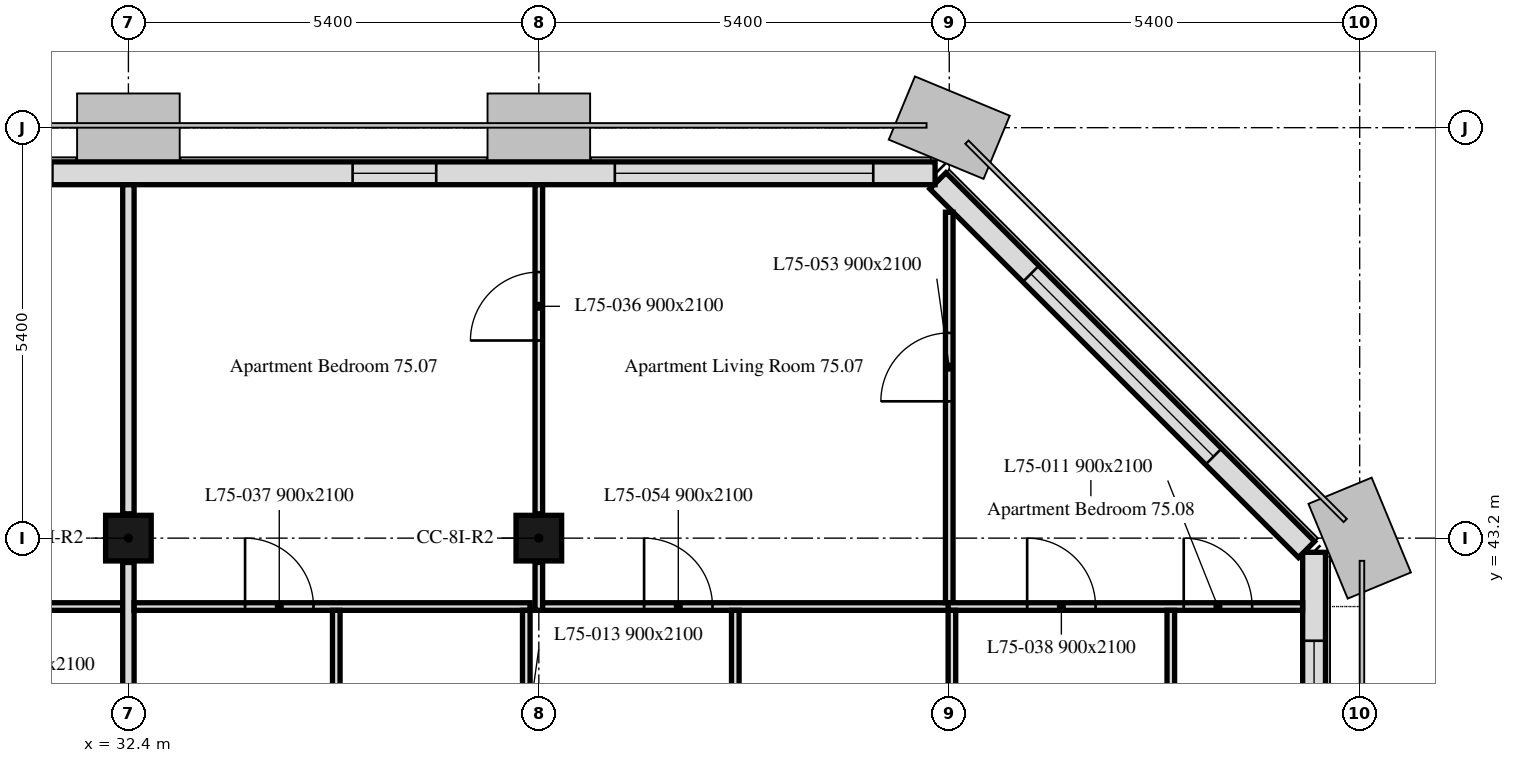
"""IFC4 building model, lengths in metres.
Left out: names, types, materials, properties, quantities, classifications, styles, units other than length and angle.
Written with IfcOpenShell. Run it as: python <this file> out.ifc"""

import sys

from ifc_helpers import new_model, si_unit, direction, frame, frame_2d, origin, origin_2d, place, context, subcontext, project, spatial, rectangle, extrude, element, fill, save


model = new_model("IFC4")
c1 = context("Model", 3, precision=1e-05, world=origin(), true_north=direction((0.0, 1.0)))
c2 = subcontext(c1, "Body", "Model", "MODEL_VIEW")
j1 = project(units=[si_unit("LENGTHUNIT", "METRE"), si_unit("PLANEANGLEUNIT", "RADIAN")], contexts=[c1])
p1 = place(None, origin())
s1 = spatial("IfcSite", under=j1, at=p1, CompositionType="ELEMENT")
p2 = place(p1, origin())
s2 = spatial("IfcBuilding", under=s1, at=p2, CompositionType="ELEMENT")
p3 = place(p2, frame((0.0, 0.0, 301.6)))
s3 = spatial("IfcBuildingStorey", under=s2, at=p3, CompositionType="ELEMENT", Elevation=301.6)
for number, where, z_axis, x_axis in (
    (1, (32.4, 43.2, 0.0), (0.0, 0.0, 1.0), (1.0, 0.0, 0.0)),
    (2, (37.8, 43.2, 0.0), (0.0, 0.0, 1.0), (1.0, 0.0, 0.0)),
):
    element("IfcColumn", number, at=place(p3, frame(where, z_axis=z_axis, x_axis=x_axis)), inside=s3, PredefinedType="COLUMN", context=c2, shape_type="SweptSolid", body=[
        extrude(rectangle(XDim=0.6, YDim=0.6, at=origin_2d()), origin(), (0.0, 0.0, 1.0), 3.0),
    ])
p4 = place(p3, frame((48.0, 10.986, 0.0), z_axis=(0.0, 0.0, 1.0), x_axis=(0.0, 1.0, 0.0)))
e3 = element("IfcWall", 3, at=p4, inside=s3, PredefinedType="SOLIDWALL", context=c2, shape_type="SweptSolid", body=[
    extrude(rectangle(XDim=32.027, YDim=0.3, at=frame_2d((16.014, 0.0))), origin(), (0.0, 0.0, 1.0), 3.0),
])
p5 = place(p4, frame((1.314, 0.0, 0.9)))
e4 = element("IfcOpeningElement", 4, at=p5, cuts=e3, PredefinedType="OPENING", context=c2, shape_type="SweptSolid", body=[
    extrude(rectangle(XDim=1.1, YDim=1.7, at=frame_2d((0.55, 0.85))), frame((0.0, 0.16, 0.0), z_axis=(0.0, -1.0, 0.0), x_axis=(1.0, 0.0, 0.0)), (0.0, 0.0, 1.0), 0.32),
])
p6 = place(p4, frame((2.589, 0.0, 0.9)))
e5 = element("IfcOpeningElement", 5, at=p6, cuts=e3, PredefinedType="OPENING", context=c2, shape_type="SweptSolid", body=[
    extrude(rectangle(XDim=0.65, YDim=1.7, at=frame_2d((0.325, 0.85))), frame((0.0, 0.16, 0.0), z_axis=(0.0, -1.0, 0.0), x_axis=(1.0, 0.0, 0.0)), (0.0, 0.0, 1.0), 0.32),
])
p7 = place(p4, frame((6.564, 0.0, 0.9)))
e6 = element("IfcOpeningElement", 6, at=p7, cuts=e3, PredefinedType="OPENING", context=c2, shape_type="SweptSolid", body=[
    extrude(rectangle(XDim=1.1, YDim=1.7, at=frame_2d((0.55, 0.85))), frame((0.0, 0.16, 0.0), z_axis=(0.0, -1.0, 0.0), x_axis=(1.0, 0.0, 0.0)), (0.0, 0.0, 1.0), 0.32),
])
p8 = place(p4, frame((8.164, 0.0, 0.9)))
e7 = element("IfcOpeningElement", 7, at=p8, cuts=e3, PredefinedType="OPENING", context=c2, shape_type="SweptSolid", body=[
    extrude(rectangle(XDim=1.1, YDim=1.7, at=frame_2d((0.55, 0.85))), frame((0.0, 0.16, 0.0), z_axis=(0.0, -1.0, 0.0), x_axis=(1.0, 0.0, 0.0)), (0.0, 0.0, 1.0), 0.32),
])
p9 = place(p4, frame((11.614, 0.0, 0.9)))
e8 = element("IfcOpeningElement", 8, at=p9, cuts=e3, PredefinedType="OPENING", context=c2, shape_type="SweptSolid", body=[
    extrude(rectangle(XDim=3.4, YDim=1.7, at=frame_2d((1.7, 0.85))), frame((0.0, 0.16, 0.0), z_axis=(0.0, -1.0, 0.0), x_axis=(1.0, 0.0, 0.0)), (0.0, 0.0, 1.0), 0.32),
])
p10 = place(p4, frame((17.364, 0.0, 0.9)))
e9 = element("IfcOpeningElement", 9, at=p10, cuts=e3, PredefinedType="OPENING", context=c2, shape_type="SweptSolid", body=[
    extrude(rectangle(XDim=1.1, YDim=1.7, at=frame_2d((0.55, 0.85))), frame((0.0, 0.16, 0.0), z_axis=(0.0, -1.0, 0.0), x_axis=(1.0, 0.0, 0.0)), (0.0, 0.0, 1.0), 0.32),
])
p11 = place(p4, frame((18.964, 0.0, 0.9)))
e10 = element("IfcOpeningElement", 10, at=p11, cuts=e3, PredefinedType="OPENING", context=c2, shape_type="SweptSolid", body=[
    extrude(rectangle(XDim=1.1, YDim=1.7, at=frame_2d((0.55, 0.85))), frame((0.0, 0.16, 0.0), z_axis=(0.0, -1.0, 0.0), x_axis=(1.0, 0.0, 0.0)), (0.0, 0.0, 1.0), 0.32),
])
p12 = place(p4, frame((23.389, 0.0, 0.9)))
e11 = element("IfcOpeningElement", 11, at=p12, cuts=e3, PredefinedType="OPENING", context=c2, shape_type="SweptSolid", body=[
    extrude(rectangle(XDim=0.65, YDim=1.7, at=frame_2d((0.325, 0.85))), frame((0.0, 0.16, 0.0), z_axis=(0.0, -1.0, 0.0), x_axis=(1.0, 0.0, 0.0)), (0.0, 0.0, 1.0), 0.32),
])
p13 = place(p4, frame((24.364, 0.0, 0.9)))
e12 = element("IfcOpeningElement", 12, at=p13, cuts=e3, PredefinedType="OPENING", context=c2, shape_type="SweptSolid", body=[
    extrude(rectangle(XDim=1.1, YDim=1.7, at=frame_2d((0.55, 0.85))), frame((0.0, 0.16, 0.0), z_axis=(0.0, -1.0, 0.0), x_axis=(1.0, 0.0, 0.0)), (0.0, 0.0, 1.0), 0.32),
])
p14 = place(p4, frame((28.164, 0.0, 0.9)))
e13 = element("IfcOpeningElement", 13, at=p14, cuts=e3, PredefinedType="OPENING", context=c2, shape_type="SweptSolid", body=[
    extrude(rectangle(XDim=1.1, YDim=1.7, at=frame_2d((0.55, 0.85))), frame((0.0, 0.16, 0.0), z_axis=(0.0, -1.0, 0.0), x_axis=(1.0, 0.0, 0.0)), (0.0, 0.0, 1.0), 0.32),
])
p15 = place(p4, frame((29.764, 0.0, 0.9)))
e14 = element("IfcOpeningElement", 14, at=p15, cuts=e3, PredefinedType="OPENING", context=c2, shape_type="SweptSolid", body=[
    extrude(rectangle(XDim=1.1, YDim=1.7, at=frame_2d((0.55, 0.85))), frame((0.0, 0.16, 0.0), z_axis=(0.0, -1.0, 0.0), x_axis=(1.0, 0.0, 0.0)), (0.0, 0.0, 1.0), 0.32),
])
p16 = place(p3, frame((47.901, 43.051, 0.0), z_axis=(0.0, 0.0, 1.0), x_axis=(-0.707106781187, 0.707106781187, 0.0)))
e15 = element("IfcWall", 15, at=p16, inside=s3, PredefinedType="SOLIDWALL", context=c2, shape_type="SweptSolid", body=[
    extrude(rectangle(XDim=6.86, YDim=0.3, at=frame_2d((3.43, 0.0))), origin(), (0.0, 0.0, 1.0), 3.0),
])
p17 = place(p16, frame((1.73, 0.0, 0.9)))
e16 = element("IfcOpeningElement", 16, at=p17, cuts=e15, PredefinedType="OPENING", context=c2, shape_type="SweptSolid", body=[
    extrude(rectangle(XDim=3.4, YDim=1.7, at=frame_2d((1.7, 0.85))), frame((0.0, 0.16, 0.0), z_axis=(0.0, -1.0, 0.0), x_axis=(1.0, 0.0, 0.0)), (0.0, 0.0, 1.0), 0.32),
])
p18 = place(p3, frame((43.014, 48.0, 0.0), z_axis=(0.0, 0.0, 1.0), x_axis=(-1.0, 0.0, 0.0)))
e17 = element("IfcWall", 17, at=p18, inside=s3, PredefinedType="SOLIDWALL", context=c2, shape_type="SweptSolid", body=[
    extrude(rectangle(XDim=32.027, YDim=0.3, at=frame_2d((16.014, 0.0))), origin(), (0.0, 0.0, 1.0), 3.0),
])
p19 = place(p18, frame((0.814, 0.0, 0.9)))
e18 = element("IfcOpeningElement", 18, at=p19, cuts=e17, PredefinedType="OPENING", context=c2, shape_type="SweptSolid", body=[
    extrude(rectangle(XDim=3.4, YDim=1.7, at=frame_2d((1.7, 0.85))), frame((0.0, 0.16, 0.0), z_axis=(0.0, -1.0, 0.0), x_axis=(1.0, 0.0, 0.0)), (0.0, 0.0, 1.0), 0.32),
])
p20 = place(p18, frame((6.564, 0.0, 0.9)))
e19 = element("IfcOpeningElement", 19, at=p20, cuts=e17, PredefinedType="OPENING", context=c2, shape_type="SweptSolid", body=[
    extrude(rectangle(XDim=1.1, YDim=1.7, at=frame_2d((0.55, 0.85))), frame((0.0, 0.16, 0.0), z_axis=(0.0, -1.0, 0.0), x_axis=(1.0, 0.0, 0.0)), (0.0, 0.0, 1.0), 0.32),
])
p21 = place(p18, frame((11.614, 0.0, 0.9)))
e20 = element("IfcOpeningElement", 20, at=p21, cuts=e17, PredefinedType="OPENING", context=c2, shape_type="SweptSolid", body=[
    extrude(rectangle(XDim=3.4, YDim=1.7, at=frame_2d((1.7, 0.85))), frame((0.0, 0.16, 0.0), z_axis=(0.0, -1.0, 0.0), x_axis=(1.0, 0.0, 0.0)), (0.0, 0.0, 1.0), 0.32),
])
p22 = place(p18, frame((17.364, 0.0, 0.9)))
e21 = element("IfcOpeningElement", 21, at=p22, cuts=e17, PredefinedType="OPENING", context=c2, shape_type="SweptSolid", body=[
    extrude(rectangle(XDim=1.1, YDim=1.7, at=frame_2d((0.55, 0.85))), frame((0.0, 0.16, 0.0), z_axis=(0.0, -1.0, 0.0), x_axis=(1.0, 0.0, 0.0)), (0.0, 0.0, 1.0), 0.32),
])
p23 = place(p18, frame((22.414, 0.0, 0.9)))
e22 = element("IfcOpeningElement", 22, at=p23, cuts=e17, PredefinedType="OPENING", context=c2, shape_type="SweptSolid", body=[
    extrude(rectangle(XDim=3.4, YDim=1.7, at=frame_2d((1.7, 0.85))), frame((0.0, 0.16, 0.0), z_axis=(0.0, -1.0, 0.0), x_axis=(1.0, 0.0, 0.0)), (0.0, 0.0, 1.0), 0.32),
])
p24 = place(p18, frame((28.164, 0.0, 0.9)))
e23 = element("IfcOpeningElement", 23, at=p24, cuts=e17, PredefinedType="OPENING", context=c2, shape_type="SweptSolid", body=[
    extrude(rectangle(XDim=1.1, YDim=1.7, at=frame_2d((0.55, 0.85))), frame((0.0, 0.16, 0.0), z_axis=(0.0, -1.0, 0.0), x_axis=(1.0, 0.0, 0.0)), (0.0, 0.0, 1.0), 0.32),
])
p25 = place(p3, frame((27.05, 42.3, 0.0), z_axis=(0.0, 0.0, 1.0), x_axis=(1.0, 0.0, 0.0)))
e24 = element("IfcWall", 24, at=p25, inside=s3, PredefinedType="PARTITIONING", context=c2, shape_type="SweptSolid", body=[
    extrude(rectangle(XDim=5.275, YDim=0.1, at=frame_2d((2.637, 0.0))), origin(), (0.0, 0.0, 1.0), 3.0),
])
p26 = place(p25, frame((2.7, 0.0, 0.0)))
e25 = element("IfcOpeningElement", 25, at=p26, cuts=e24, PredefinedType="OPENING", context=c2, shape_type="SweptSolid", body=[
    extrude(rectangle(XDim=0.9, YDim=2.1, at=frame_2d((0.45, 1.05))), frame((0.0, 0.05, 0.0), z_axis=(0.0, -1.0, 0.0), x_axis=(1.0, 0.0, 0.0)), (0.0, 0.0, 1.0), 0.1),
])
p27 = place(p3, frame((32.4, 43.52, 0.0), z_axis=(0.0, 0.0, 1.0), x_axis=(0.0, 1.0, 0.0)))
e26 = element("IfcWall", 26, at=p27, inside=s3, PredefinedType="PARTITIONING", context=c2, shape_type="SweptSolid", body=[
    extrude(rectangle(XDim=4.329, YDim=0.15, at=frame_2d((2.165, 0.0))), origin(), (0.0, 0.0, 1.0), 2.4),
])
p28 = place(p3, frame((32.4, 38.12, 0.0), z_axis=(0.0, 0.0, 1.0), x_axis=(0.0, 1.0, 0.0)))
e27 = element("IfcWall", 27, at=p28, inside=s3, PredefinedType="PARTITIONING", context=c2, shape_type="SweptSolid", body=[
    extrude(rectangle(XDim=4.76, YDim=0.15, at=frame_2d((2.38, 0.0))), origin(), (0.0, 0.0, 1.0), 2.4),
])
p29 = place(p3, frame((32.475, 42.3, 0.0), z_axis=(0.0, 0.0, 1.0), x_axis=(1.0, 0.0, 0.0)))
e28 = element("IfcWall", 28, at=p29, inside=s3, PredefinedType="PARTITIONING", context=c2, shape_type="SweptSolid", body=[
    extrude(rectangle(XDim=5.21, YDim=0.1, at=frame_2d((2.605, 0.0))), origin(), (0.0, 0.0, 1.0), 3.0),
])
p30 = place(p29, frame((1.46, 0.0, 0.0)))
e29 = element("IfcOpeningElement", 29, at=p30, cuts=e28, PredefinedType="OPENING", context=c2, shape_type="SweptSolid", body=[
    extrude(rectangle(XDim=0.9, YDim=2.1, at=frame_2d((0.45, 1.05))), frame((0.0, 0.05, 0.0), z_axis=(0.0, -1.0, 0.0), x_axis=(1.0, 0.0, 0.0)), (0.0, 0.0, 1.0), 0.1),
])
p31 = place(p3, frame((37.8, 42.25, 0.0), z_axis=(0.0, 0.0, 1.0), x_axis=(0.0, 1.0, 0.0)))
e30 = element("IfcWall", 30, at=p31, inside=s3, PredefinedType="PARTITIONING", context=c2, shape_type="SweptSolid", body=[
    extrude(rectangle(XDim=0.63, YDim=0.1, at=frame_2d((0.315, 0.0))), origin(), (0.0, 0.0, 1.0), 2.4),
])
p32 = place(p3, frame((37.8, 43.52, 0.0), z_axis=(0.0, 0.0, 1.0), x_axis=(0.0, 1.0, 0.0)))
e31 = element("IfcWall", 31, at=p32, inside=s3, PredefinedType="PARTITIONING", context=c2, shape_type="SweptSolid", body=[
    extrude(rectangle(XDim=4.329, YDim=0.1, at=frame_2d((2.165, 0.0))), origin(), (0.0, 0.0, 1.0), 2.4),
])
p33 = place(p32, frame((2.28, 0.0, 0.0)))
e32 = element("IfcOpeningElement", 32, at=p33, cuts=e31, PredefinedType="OPENING", context=c2, shape_type="SweptSolid", body=[
    extrude(rectangle(XDim=0.9, YDim=2.1, at=frame_2d((0.45, 1.05))), frame((0.0, 0.05, 0.0), z_axis=(0.0, -1.0, 0.0), x_axis=(1.0, 0.0, 0.0)), (0.0, 0.0, 1.0), 0.1),
])
p34 = place(p3, frame((37.85, 42.3, 0.0), z_axis=(0.0, 0.0, 1.0), x_axis=(1.0, 0.0, 0.0)))
e33 = element("IfcWall", 33, at=p34, inside=s3, PredefinedType="PARTITIONING", context=c2, shape_type="SweptSolid", body=[
    extrude(rectangle(XDim=5.4, YDim=0.1, at=frame_2d((2.7, 0.0))), origin(), (0.0, 0.0, 1.0), 3.0),
])
p35 = place(p34, frame((1.335, 0.0, 0.0)))
e34 = element("IfcOpeningElement", 34, at=p35, cuts=e33, PredefinedType="OPENING", context=c2, shape_type="SweptSolid", body=[
    extrude(rectangle(XDim=0.9, YDim=2.1, at=frame_2d((0.45, 1.05))), frame((0.0, 0.05, 0.0), z_axis=(0.0, -1.0, 0.0), x_axis=(1.0, 0.0, 0.0)), (0.0, 0.0, 1.0), 0.1),
])
p36 = place(p3, frame((43.2, 42.35, 0.0), z_axis=(0.0, 0.0, 1.0), x_axis=(0.0, 1.0, 0.0)))
e35 = element("IfcWall", 35, at=p36, inside=s3, PredefinedType="PARTITIONING", context=c2, shape_type="SweptSolid", body=[
    extrude(rectangle(XDim=5.138, YDim=0.1, at=frame_2d((2.569, 0.0))), origin(), (0.0, 0.0, 1.0), 3.0),
])
p37 = place(p36, frame((2.65, 0.0, 0.0)))
e36 = element("IfcOpeningElement", 36, at=p37, cuts=e35, PredefinedType="OPENING", context=c2, shape_type="SweptSolid", body=[
    extrude(rectangle(XDim=0.9, YDim=2.1, at=frame_2d((0.45, 1.05))), frame((0.0, 0.05, 0.0), z_axis=(0.0, -1.0, 0.0), x_axis=(1.0, 0.0, 0.0)), (0.0, 0.0, 1.0), 0.1),
])
p38 = place(p3, frame((43.185, 42.3, 0.0), z_axis=(0.0, 0.0, 1.0), x_axis=(1.0, 0.0, 0.0)))
e37 = element("IfcWall", 37, at=p38, inside=s3, PredefinedType="PARTITIONING", context=c2, shape_type="SweptSolid", body=[
    extrude(rectangle(XDim=4.664, YDim=0.1, at=frame_2d((2.332, 0.0))), origin(), (0.0, 0.0, 1.0), 3.0),
])
p39 = place(p38, frame((3.1, 0.0, 0.0)))
e38 = element("IfcOpeningElement", 38, at=p39, cuts=e37, PredefinedType="OPENING", context=c2, shape_type="SweptSolid", body=[
    extrude(rectangle(XDim=0.9, YDim=2.1, at=frame_2d((0.45, 1.05))), frame((0.0, 0.05, 0.0), z_axis=(0.0, -1.0, 0.0), x_axis=(1.0, 0.0, 0.0)), (0.0, 0.0, 1.0), 0.1),
])
p40 = place(p38, frame((1.04, 0.0, 0.0)))
e39 = element("IfcOpeningElement", 39, at=p40, cuts=e37, PredefinedType="OPENING", context=c2, shape_type="SweptSolid", body=[
    extrude(rectangle(XDim=0.9, YDim=2.1, at=frame_2d((0.45, 1.05))), frame((0.0, 0.05, 0.0), z_axis=(0.0, -1.0, 0.0), x_axis=(1.0, 0.0, 0.0)), (0.0, 0.0, 1.0), 0.1),
])
p41 = place(p3, frame((35.135, 36.95, 0.0), z_axis=(0.0, 0.0, 1.0), x_axis=(0.0, 1.0, 0.0)))
e40 = element("IfcWall", 40, at=p41, inside=s3, PredefinedType="PARTITIONING", context=c2, shape_type="SweptSolid", body=[
    extrude(rectangle(XDim=5.3, YDim=0.1, at=frame_2d((2.65, 0.0))), origin(), (0.0, 0.0, 1.0), 2.4),
])
p42 = place(p3, frame((37.635, 38.12, 0.0), z_axis=(0.0, 0.0, 1.0), x_axis=(0.0, 1.0, 0.0)))
e41 = element("IfcWall", 41, at=p42, inside=s3, PredefinedType="PARTITIONING", context=c2, shape_type="SweptSolid", body=[
    extrude(rectangle(XDim=4.13, YDim=0.1, at=frame_2d((2.065, 0.0))), origin(), (0.0, 0.0, 1.0), 2.4),
])
p43 = place(p42, frame((2.005, 0.0, 0.0)))
e42 = element("IfcOpeningElement", 42, at=p43, cuts=e41, PredefinedType="OPENING", context=c2, shape_type="SweptSolid", body=[
    extrude(rectangle(XDim=0.9, YDim=2.1, at=frame_2d((0.45, 1.05))), frame((0.0, 0.05, 0.0), z_axis=(0.0, -1.0, 0.0), x_axis=(1.0, 0.0, 0.0)), (0.0, 0.0, 1.0), 0.1),
])
p44 = place(p3, frame((40.385, 34.275, 0.0), z_axis=(0.0, 0.0, 1.0), x_axis=(0.0, 1.0, 0.0)))
e43 = element("IfcWall", 43, at=p44, inside=s3, PredefinedType="PARTITIONING", context=c2, shape_type="SweptSolid", body=[
    extrude(rectangle(XDim=7.975, YDim=0.1, at=frame_2d((3.988, 0.0))), origin(), (0.0, 0.0, 1.0), 2.4),
])
p45 = place(p44, frame((4.875, 0.0, 0.0)))
e44 = element("IfcOpeningElement", 44, at=p45, cuts=e43, PredefinedType="OPENING", context=c2, shape_type="SweptSolid", body=[
    extrude(rectangle(XDim=0.9, YDim=2.1, at=frame_2d((0.45, 1.05))), frame((0.0, 0.05, 0.0), z_axis=(0.0, -1.0, 0.0), x_axis=(1.0, 0.0, 0.0)), (0.0, 0.0, 1.0), 0.1),
])
p46 = place(p44, frame((0.262, 0.0, 0.0)))
e45 = element("IfcOpeningElement", 45, at=p46, cuts=e43, PredefinedType="OPENING", context=c2, shape_type="SweptSolid", body=[
    extrude(rectangle(XDim=0.9, YDim=2.1, at=frame_2d((0.45, 1.05))), frame((0.0, 0.05, 0.0), z_axis=(0.0, -1.0, 0.0), x_axis=(1.0, 0.0, 0.0)), (0.0, 0.0, 1.0), 0.1),
])
p47 = place(p3, frame((43.235, 38.12, 0.0), z_axis=(0.0, 0.0, 1.0), x_axis=(0.0, 1.0, 0.0)))
e46 = element("IfcWall", 46, at=p47, inside=s3, PredefinedType="PARTITIONING", context=c2, shape_type="SweptSolid", body=[
    extrude(rectangle(XDim=4.13, YDim=0.1, at=frame_2d((2.065, 0.0))), origin(), (0.0, 0.0, 1.0), 3.0),
])
p48 = place(p3, frame((46.115, 34.275, 0.0), z_axis=(0.0, 0.0, 1.0), x_axis=(0.0, 1.0, 0.0)))
e47 = element("IfcWall", 47, at=p48, inside=s3, PredefinedType="PARTITIONING", context=c2, shape_type="SweptSolid", body=[
    extrude(rectangle(XDim=7.975, YDim=0.1, at=frame_2d((3.988, 0.0))), origin(), (0.0, 0.0, 1.0), 2.4),
])
p49 = place(p15, origin())
e48 = element("IfcWindow", 48, at=p49, inside=s3, PartitioningType="SINGLE_PANEL", PredefinedType="WINDOW", context=c2, shape_type="SweptSolid", body=[
    extrude(rectangle(XDim=1.1, YDim=1.7, at=frame_2d((0.55, 0.85))), frame((0.0, 0.03, 0.0), z_axis=(0.0, -1.0, 0.0), x_axis=(1.0, 0.0, 0.0)), (0.0, 0.0, 1.0), 0.06),
])
fill(e14, e48)
p50 = place(p17, origin())
e49 = element("IfcWindow", 49, at=p50, inside=s3, PartitioningType="SINGLE_PANEL", PredefinedType="WINDOW", context=c2, shape_type="SweptSolid", body=[
    extrude(rectangle(XDim=3.4, YDim=1.7, at=frame_2d((1.7, 0.85))), frame((0.0, 0.03, 0.0), z_axis=(0.0, -1.0, 0.0), x_axis=(1.0, 0.0, 0.0)), (0.0, 0.0, 1.0), 0.06),
])
fill(e16, e49)
p51 = place(p19, origin())
e50 = element("IfcWindow", 50, at=p51, inside=s3, PartitioningType="SINGLE_PANEL", PredefinedType="WINDOW", context=c2, shape_type="SweptSolid", body=[
    extrude(rectangle(XDim=3.4, YDim=1.7, at=frame_2d((1.7, 0.85))), frame((0.0, 0.03, 0.0), z_axis=(0.0, -1.0, 0.0), x_axis=(1.0, 0.0, 0.0)), (0.0, 0.0, 1.0), 0.06),
])
fill(e18, e50)
p52 = place(p20, origin())
e51 = element("IfcWindow", 51, at=p52, inside=s3, PartitioningType="SINGLE_PANEL", PredefinedType="WINDOW", context=c2, shape_type="SweptSolid", body=[
    extrude(rectangle(XDim=1.1, YDim=1.7, at=frame_2d((0.55, 0.85))), frame((0.0, 0.03, 0.0), z_axis=(0.0, -1.0, 0.0), x_axis=(1.0, 0.0, 0.0)), (0.0, 0.0, 1.0), 0.06),
])
fill(e19, e51)
p53 = place(p21, origin())
e52 = element("IfcWindow", 52, at=p53, inside=s3, PartitioningType="SINGLE_PANEL", PredefinedType="WINDOW", context=c2, shape_type="SweptSolid", body=[
    extrude(rectangle(XDim=3.4, YDim=1.7, at=frame_2d((1.7, 0.85))), frame((0.0, 0.03, 0.0), z_axis=(0.0, -1.0, 0.0), x_axis=(1.0, 0.0, 0.0)), (0.0, 0.0, 1.0), 0.06),
])
fill(e20, e52)
p54 = place(p39, origin())
e53 = element("IfcDoor", 53, at=p54, inside=s3, OperationType="SINGLE_SWING_LEFT", PredefinedType="DOOR", context=c2, shape_type="SweptSolid", body=[
    extrude(rectangle(XDim=0.9, YDim=2.1, at=frame_2d((0.45, 1.05))), frame((0.0, 0.025, 0.0), z_axis=(0.0, -1.0, 0.0), x_axis=(1.0, 0.0, 0.0)), (0.0, 0.0, 1.0), 0.05),
])
fill(e38, e53)
p55 = place(p33, origin())
e54 = element("IfcDoor", 54, at=p55, inside=s3, OperationType="SINGLE_SWING_RIGHT", PredefinedType="DOOR", context=c2, shape_type="SweptSolid", body=[
    extrude(rectangle(XDim=0.9, YDim=2.1, at=frame_2d((0.45, 1.05))), frame((0.0, 0.025, 0.0), z_axis=(0.0, -1.0, 0.0), x_axis=(1.0, 0.0, 0.0)), (0.0, 0.0, 1.0), 0.05),
])
fill(e32, e54)
p56 = place(p30, origin())
e55 = element("IfcDoor", 55, at=p56, inside=s3, OperationType="SINGLE_SWING_LEFT", PredefinedType="DOOR", context=c2, shape_type="SweptSolid", body=[
    extrude(rectangle(XDim=0.9, YDim=2.1, at=frame_2d((0.45, 1.05))), frame((0.0, 0.025, 0.0), z_axis=(0.0, -1.0, 0.0), x_axis=(1.0, 0.0, 0.0)), (0.0, 0.0, 1.0), 0.05),
])
fill(e29, e55)
p57 = place(p40, origin())
e56 = element("IfcDoor", 56, at=p57, inside=s3, OperationType="SINGLE_SWING_RIGHT", PredefinedType="DOOR", context=c2, shape_type="SweptSolid", body=[
    extrude(rectangle(XDim=0.9, YDim=2.1, at=frame_2d((0.45, 1.05))), frame((0.0, 0.025, 0.0), z_axis=(0.0, -1.0, 0.0), x_axis=(1.0, 0.0, 0.0)), (0.0, 0.0, 1.0), 0.05),
])
fill(e39, e56)
p58 = place(p37, origin())
e57 = element("IfcDoor", 57, at=p58, inside=s3, OperationType="SINGLE_SWING_LEFT", PredefinedType="DOOR", context=c2, shape_type="SweptSolid", body=[
    extrude(rectangle(XDim=0.9, YDim=2.1, at=frame_2d((0.45, 1.05))), frame((0.0, 0.025, 0.0), z_axis=(0.0, -1.0, 0.0), x_axis=(1.0, 0.0, 0.0)), (0.0, 0.0, 1.0), 0.05),
])
fill(e36, e57)
p59 = place(p35, origin())
e58 = element("IfcDoor", 58, at=p59, inside=s3, OperationType="SINGLE_SWING_LEFT", PredefinedType="DOOR", context=c2, shape_type="SweptSolid", body=[
    extrude(rectangle(XDim=0.9, YDim=2.1, at=frame_2d((0.45, 1.05))), frame((0.0, 0.025, 0.0), z_axis=(0.0, -1.0, 0.0), x_axis=(1.0, 0.0, 0.0)), (0.0, 0.0, 1.0), 0.05),
])
fill(e34, e58)
save(model, sys.argv[1])
